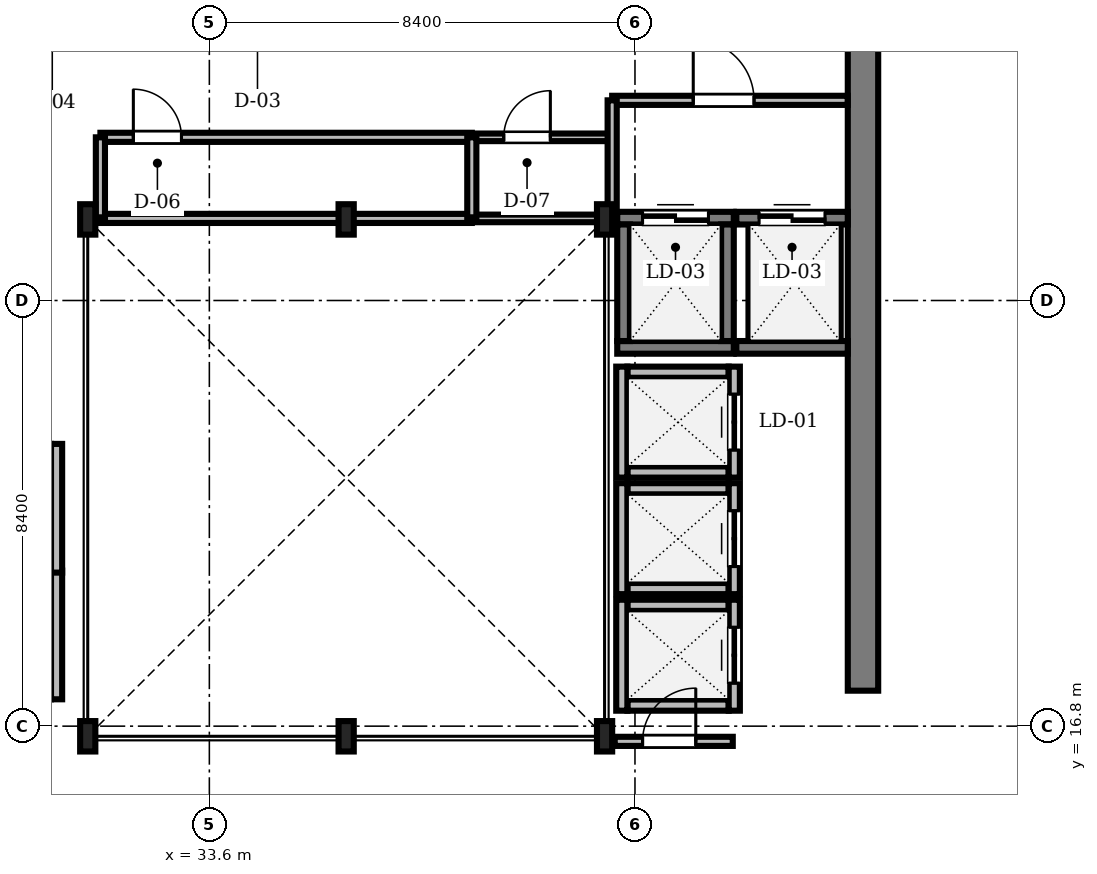
"""IFC4 building model, lengths in metres.
Left out: names, types, materials, properties, quantities, classifications, styles, units other than length and angle.
Written with IfcOpenShell. Run it as: python <this file> out.ifc"""

import sys

from ifc_helpers import new_model, si_unit, direction, frame, frame_2d, origin, origin_2d, place, context, subcontext, project, spatial, rectangle, i_section, extrude, source, transform, mapped, element, fill, save


model = new_model("IFC4")
c1 = context("Model", 3, precision=1e-05, world=origin(), true_north=direction((0.0, 1.0)))
c2 = subcontext(c1, "Body", "Model", "MODEL_VIEW")
j1 = project(units=[si_unit("LENGTHUNIT", "METRE"), si_unit("PLANEANGLEUNIT", "RADIAN")], contexts=[c1])
p1 = place(None, origin())
s1 = spatial("IfcSite", under=j1, at=p1, CompositionType="ELEMENT")
p2 = place(p1, origin())
s2 = spatial("IfcBuilding", under=s1, at=p2, CompositionType="ELEMENT")
p3 = place(p2, frame((0.0, 0.0, 246.65)))
s3 = spatial("IfcBuildingStorey", under=s2, at=p3, CompositionType="ELEMENT", Elevation=246.65)
m1 = source(origin(), c2, "Body", "SweptSolid", [
    extrude(rectangle(XDim=13.15, YDim=0.6, at=frame_2d((6.575, 0.0))), origin(), (0.0, 0.0, 1.0), 3.73),
])
p4 = place(p3, frame((46.5, 17.5, 0.0), z_axis=(0.0, 0.0, 1.0), x_axis=(0.0, 1.0, 0.0)))
e1 = element("IfcWall", 1, at=p4, inside=s3, PredefinedType="SHEAR", context=c2, shape_type="MappedRepresentation", body=[
    mapped(m1, transform((0.0, 0.0, 0.0), scale=1.0)),
])
m2 = source(origin(), c2, "Body", "SweptSolid", [
    extrude(i_section(OverallWidth=0.3, OverallDepth=0.6, WebThickness=0.015, FlangeThickness=0.03, FilletRadius=0.027, at=origin_2d()), origin(), (0.0, 0.0, 1.0), 3.73),
])
for number, where, z_axis, x_axis in (
    (2, (31.2, 16.6, 0.0), (0.0, 0.0, 1.0), (1.0, 0.0, 0.0)),
    (3, (36.3, 16.6, 0.0), (0.0, 0.0, 1.0), (1.0, 0.0, 0.0)),
    (4, (41.4, 16.6, 0.0), (0.0, 0.0, 1.0), (1.0, 0.0, 0.0)),
    (5, (41.4, 26.8, 0.0), (0.0, 0.0, 1.0), (1.0, 0.0, 0.0)),
    (6, (36.3, 26.8, 0.0), (0.0, 0.0, 1.0), (1.0, 0.0, 0.0)),
    (7, (31.2, 26.8, 0.0), (0.0, 0.0, 1.0), (1.0, 0.0, 0.0)),
):
    element("IfcColumn", number, at=place(p3, frame(where, z_axis=z_axis, x_axis=x_axis)), inside=s3, PredefinedType="COLUMN", context=c2, shape_type="MappedRepresentation", body=[
        mapped(m2, transform((0.0, 0.0, 0.0), scale=1.0)),
    ])
m3 = source(origin(), c2, "Body", "SweptSolid", [
    extrude(rectangle(XDim=2.0, YDim=0.22, at=frame_2d((1.0, 0.0))), origin(), (0.0, 0.0, 1.0), 3.73),
])
for number, where, z_axis, x_axis in (
    (8, (41.85, 21.815, 0.0), (0.0, 0.0, 1.0), (1.0, 0.0, 0.0)),
    (9, (41.85, 23.785, 0.0), (0.0, 0.0, 1.0), (1.0, 0.0, 0.0)),
):
    element("IfcWall", number, at=place(p3, frame(where, z_axis=z_axis, x_axis=x_axis)), inside=s3, PredefinedType="SOLIDWALL", context=c2, shape_type="MappedRepresentation", body=[
        mapped(m3, transform((0.0, 0.0, 0.0), scale=1.0)),
    ])
m4 = source(origin(), c2, "Body", "SweptSolid", [
    extrude(rectangle(XDim=2.19, YDim=0.22, at=frame_2d((1.095, 0.0))), origin(), (0.0, 0.0, 1.0), 3.73),
])
p5 = place(p3, frame((41.74, 21.705, 0.0), z_axis=(0.0, 0.0, 1.0), x_axis=(0.0, 1.0, 0.0)))
e10 = element("IfcWall", 10, at=p5, inside=s3, PredefinedType="SOLIDWALL", context=c2, shape_type="MappedRepresentation", body=[
    mapped(m4, transform((0.0, 0.0, 0.0), scale=1.0)),
])
p6 = place(p3, frame((43.96, 21.705, 0.0), z_axis=(0.0, 0.0, 1.0), x_axis=(0.0, 1.0, 0.0)))
e11 = element("IfcWall", 11, at=p6, inside=s3, PredefinedType="SOLIDWALL", context=c2, shape_type="MappedRepresentation", body=[
    mapped(m4, transform((0.0, 0.0, 0.0), scale=1.0)),
])
m5 = source(origin(), c2, "Body", "SweptSolid", [
    extrude(rectangle(XDim=1.1, YDim=2.2, at=frame_2d((0.55, 1.1))), frame((0.0, 0.12, 0.0), z_axis=(0.0, -1.0, 0.0), x_axis=(1.0, 0.0, 0.0)), (0.0, 0.0, 1.0), 0.24),
])
p7 = place(p6, frame((0.545, 0.0, 0.0)))
e12 = element("IfcOpeningElement", 12, at=p7, cuts=e11, PredefinedType="OPENING", context=c2, shape_type="MappedRepresentation", body=[
    mapped(m5, transform((0.0, 0.0, 0.0), scale=1.0)),
])
for number, where, z_axis, x_axis in (
    (13, (41.85, 19.515, 0.0), (0.0, 0.0, 1.0), (1.0, 0.0, 0.0)),
    (14, (41.85, 21.485, 0.0), (0.0, 0.0, 1.0), (1.0, 0.0, 0.0)),
):
    element("IfcWall", number, at=place(p3, frame(where, z_axis=z_axis, x_axis=x_axis)), inside=s3, PredefinedType="SOLIDWALL", context=c2, shape_type="MappedRepresentation", body=[
        mapped(m3, transform((0.0, 0.0, 0.0), scale=1.0)),
    ])
p8 = place(p3, frame((41.74, 19.405, 0.0), z_axis=(0.0, 0.0, 1.0), x_axis=(0.0, 1.0, 0.0)))
e15 = element("IfcWall", 15, at=p8, inside=s3, PredefinedType="SOLIDWALL", context=c2, shape_type="MappedRepresentation", body=[
    mapped(m4, transform((0.0, 0.0, 0.0), scale=1.0)),
])
p9 = place(p3, frame((43.96, 19.405, 0.0), z_axis=(0.0, 0.0, 1.0), x_axis=(0.0, 1.0, 0.0)))
e16 = element("IfcWall", 16, at=p9, inside=s3, PredefinedType="SOLIDWALL", context=c2, shape_type="MappedRepresentation", body=[
    mapped(m4, transform((0.0, 0.0, 0.0), scale=1.0)),
])
p10 = place(p9, frame((0.545, 0.0, 0.0)))
e17 = element("IfcOpeningElement", 17, at=p10, cuts=e16, PredefinedType="OPENING", context=c2, shape_type="MappedRepresentation", body=[
    mapped(m5, transform((0.0, 0.0, 0.0), scale=1.0)),
])
for number, where, z_axis, x_axis in (
    (18, (41.85, 17.215, 0.0), (0.0, 0.0, 1.0), (1.0, 0.0, 0.0)),
    (19, (41.85, 19.185, 0.0), (0.0, 0.0, 1.0), (1.0, 0.0, 0.0)),
):
    element("IfcWall", number, at=place(p3, frame(where, z_axis=z_axis, x_axis=x_axis)), inside=s3, PredefinedType="SOLIDWALL", context=c2, shape_type="MappedRepresentation", body=[
        mapped(m3, transform((0.0, 0.0, 0.0), scale=1.0)),
    ])
p11 = place(p3, frame((41.74, 17.105, 0.0), z_axis=(0.0, 0.0, 1.0), x_axis=(0.0, 1.0, 0.0)))
e20 = element("IfcWall", 20, at=p11, inside=s3, PredefinedType="SOLIDWALL", context=c2, shape_type="MappedRepresentation", body=[
    mapped(m4, transform((0.0, 0.0, 0.0), scale=1.0)),
])
p12 = place(p3, frame((43.96, 17.105, 0.0), z_axis=(0.0, 0.0, 1.0), x_axis=(0.0, 1.0, 0.0)))
e21 = element("IfcWall", 21, at=p12, inside=s3, PredefinedType="SOLIDWALL", context=c2, shape_type="MappedRepresentation", body=[
    mapped(m4, transform((0.0, 0.0, 0.0), scale=1.0)),
])
p13 = place(p12, frame((0.545, 0.0, 0.0)))
e22 = element("IfcOpeningElement", 22, at=p13, cuts=e21, PredefinedType="OPENING", context=c2, shape_type="MappedRepresentation", body=[
    mapped(m5, transform((0.0, 0.0, 0.0), scale=1.0)),
])
m6 = source(origin(), c2, "Body", "SweptSolid", [
    extrude(rectangle(XDim=2.54, YDim=0.22, at=frame_2d((1.27, 0.0))), origin(), (0.0, 0.0, 1.0), 3.73),
])
for number, where, z_axis, x_axis in (
    (23, (30.585, 17.33, 0.0), (0.0, 0.0, 1.0), (0.0, 1.0, 0.0)),
    (24, (30.585, 19.83, 0.0), (0.0, 0.0, 1.0), (0.0, 1.0, 0.0)),
):
    element("IfcWall", number, at=place(p3, frame(where, z_axis=z_axis, x_axis=x_axis)), inside=s3, PredefinedType="SOLIDWALL", context=c2, shape_type="MappedRepresentation", body=[
        mapped(m6, transform((0.0, 0.0, 0.0), scale=1.0)),
    ])
m7 = source(origin(), c2, "Body", "SweptSolid", [
    extrude(rectangle(XDim=2.3, YDim=0.25, at=frame_2d((1.15, 0.0))), origin(), (0.0, 0.0, 1.0), 3.73),
])
p14 = place(p3, frame((41.65, 24.275, 0.0), z_axis=(0.0, 0.0, 1.0), x_axis=(1.0, 0.0, 0.0)))
e25 = element("IfcWall", 25, at=p14, inside=s3, PredefinedType="SOLIDWALL", context=c2, shape_type="MappedRepresentation", body=[
    mapped(m7, transform((0.0, 0.0, 0.0), scale=1.0)),
])
p15 = place(p3, frame((41.65, 26.825, 0.0), z_axis=(0.0, 0.0, 1.0), x_axis=(1.0, 0.0, 0.0)))
e26 = element("IfcWall", 26, at=p15, inside=s3, PredefinedType="SOLIDWALL", context=c2, shape_type="MappedRepresentation", body=[
    mapped(m7, transform((0.0, 0.0, 0.0), scale=1.0)),
])
m8 = source(origin(), c2, "Body", "SweptSolid", [
    extrude(rectangle(XDim=1.3, YDim=2.3, at=frame_2d((0.65, 1.15))), frame((0.0, 0.135, 0.0), z_axis=(0.0, -1.0, 0.0), x_axis=(1.0, 0.0, 0.0)), (0.0, 0.0, 1.0), 0.27),
])
p16 = place(p15, frame((0.5, 0.0, 0.0)))
e27 = element("IfcOpeningElement", 27, at=p16, cuts=e26, PredefinedType="OPENING", context=c2, shape_type="MappedRepresentation", body=[
    mapped(m8, transform((0.0, 0.0, 0.0), scale=1.0)),
])
for number, where, z_axis, x_axis in (
    (28, (41.775, 24.4, 0.0), (0.0, 0.0, 1.0), (0.0, 1.0, 0.0)),
    (29, (43.825, 24.4, 0.0), (0.0, 0.0, 1.0), (0.0, 1.0, 0.0)),
):
    element("IfcWall", number, at=place(p3, frame(where, z_axis=z_axis, x_axis=x_axis)), inside=s3, PredefinedType="SOLIDWALL", context=c2, shape_type="MappedRepresentation", body=[
        mapped(m7, transform((0.0, 0.0, 0.0), scale=1.0)),
    ])
m9 = source(origin(), c2, "Body", "SweptSolid", [
    extrude(rectangle(XDim=2.2, YDim=0.25, at=frame_2d((1.1, 0.0))), origin(), (0.0, 0.0, 1.0), 3.73),
])
p17 = place(p3, frame((44.0, 24.275, 0.0), z_axis=(0.0, 0.0, 1.0), x_axis=(1.0, 0.0, 0.0)))
e30 = element("IfcWall", 30, at=p17, inside=s3, PredefinedType="SOLIDWALL", context=c2, shape_type="MappedRepresentation", body=[
    mapped(m9, transform((0.0, 0.0, 0.0), scale=1.0)),
])
p18 = place(p3, frame((44.0, 26.825, 0.0), z_axis=(0.0, 0.0, 1.0), x_axis=(1.0, 0.0, 0.0)))
e31 = element("IfcWall", 31, at=p18, inside=s3, PredefinedType="SOLIDWALL", context=c2, shape_type="MappedRepresentation", body=[
    mapped(m9, transform((0.0, 0.0, 0.0), scale=1.0)),
])
p19 = place(p18, frame((0.45, 0.0, 0.0)))
e32 = element("IfcOpeningElement", 32, at=p19, cuts=e31, PredefinedType="OPENING", context=c2, shape_type="MappedRepresentation", body=[
    mapped(m8, transform((0.0, 0.0, 0.0), scale=1.0)),
])
m10 = source(origin(), c2, "Body", "SweptSolid", [
    extrude(rectangle(XDim=7.33, YDim=0.18, at=frame_2d((3.665, 0.0))), origin(), (0.0, 0.0, 1.0), 3.362),
])
p20 = place(p3, frame((31.45, 28.42, 0.0), z_axis=(0.0, 0.0, 1.0), x_axis=(1.0, 0.0, 0.0)))
e33 = element("IfcWall", 33, at=p20, inside=s3, PredefinedType="PARTITIONING", context=c2, shape_type="MappedRepresentation", body=[
    mapped(m10, transform((0.0, 0.0, 0.0), scale=1.0)),
])
m11 = source(origin(), c2, "Body", "SweptSolid", [
    extrude(rectangle(XDim=0.95, YDim=2.15, at=frame_2d((0.475, 1.075))), frame((0.0, 0.1, 0.0), z_axis=(0.0, -1.0, 0.0), x_axis=(1.0, 0.0, 0.0)), (0.0, 0.0, 1.0), 0.2),
])
p21 = place(p20, frame((0.65, 0.0, 0.0)))
e34 = element("IfcOpeningElement", 34, at=p21, cuts=e33, PredefinedType="OPENING", context=c2, shape_type="MappedRepresentation", body=[
    mapped(m11, transform((0.0, 0.0, 0.0), scale=1.0)),
])
m12 = source(origin(), c2, "Body", "SweptSolid", [
    extrude(rectangle(XDim=4.648, YDim=0.18, at=frame_2d((2.324, 0.0))), origin(), (0.0, 0.0, 1.0), 3.362),
])
p22 = place(p3, frame((41.55, 29.15, 0.0), z_axis=(0.0, 0.0, 1.0), x_axis=(1.0, 0.0, 0.0)))
e35 = element("IfcWall", 35, at=p22, inside=s3, PredefinedType="PARTITIONING", context=c2, shape_type="MappedRepresentation", body=[
    mapped(m12, transform((0.0, 0.0, 0.0), scale=1.0)),
])
m13 = source(origin(), c2, "Body", "SweptSolid", [
    extrude(rectangle(XDim=1.2, YDim=2.2, at=frame_2d((0.6, 1.1))), frame((0.0, 0.1, 0.0), z_axis=(0.0, -1.0, 0.0), x_axis=(1.0, 0.0, 0.0)), (0.0, 0.0, 1.0), 0.2),
])
p23 = place(p22, frame((1.6, 0.0, 0.0)))
e36 = element("IfcOpeningElement", 36, at=p23, cuts=e35, PredefinedType="OPENING", context=c2, shape_type="MappedRepresentation", body=[
    mapped(m13, transform((0.0, 0.0, 0.0), scale=1.0)),
])
m14 = source(origin(), c2, "Body", "SweptSolid", [
    extrude(rectangle(XDim=2.74, YDim=0.15, at=frame_2d((1.37, 0.0))), origin(), (0.0, 0.0, 1.0), 3.73),
])
p24 = place(p3, frame((38.78, 28.42, 0.0), z_axis=(0.0, 0.0, 1.0), x_axis=(1.0, 0.0, 0.0)))
e37 = element("IfcWall", 37, at=p24, inside=s3, PredefinedType="PARTITIONING", context=c2, shape_type="MappedRepresentation", body=[
    mapped(m14, transform((0.0, 0.0, 0.0), scale=1.0)),
])
m15 = source(origin(), c2, "Body", "SweptSolid", [
    extrude(rectangle(XDim=0.92, YDim=2.1, at=frame_2d((0.46, 1.05))), frame((0.0, 0.085, 0.0), z_axis=(0.0, -1.0, 0.0), x_axis=(1.0, 0.0, 0.0)), (0.0, 0.0, 1.0), 0.17),
])
p25 = place(p24, frame((0.63, 0.0, 0.0)))
e38 = element("IfcOpeningElement", 38, at=p25, cuts=e37, PredefinedType="OPENING", context=c2, shape_type="MappedRepresentation", body=[
    mapped(m15, transform((0.0, 0.0, 0.0), scale=1.0)),
])
m16 = source(origin(), c2, "Body", "SweptSolid", [
    extrude(rectangle(XDim=2.33, YDim=0.18, at=frame_2d((1.165, 0.0))), origin(), (0.0, 0.0, 1.0), 3.172),
])
p26 = place(p3, frame((41.6, 16.5, 0.0), z_axis=(0.0, 0.0, 1.0), x_axis=(1.0, 0.0, 0.0)))
e39 = element("IfcWall", 39, at=p26, inside=s3, PredefinedType="PARTITIONING", context=c2, shape_type="MappedRepresentation", body=[
    mapped(m16, transform((0.0, 0.0, 0.0), scale=1.0)),
])
m17 = source(origin(), c2, "Body", "SweptSolid", [
    extrude(rectangle(XDim=1.05, YDim=2.2, at=frame_2d((0.525, 1.1))), frame((0.0, 0.1, 0.0), z_axis=(0.0, -1.0, 0.0), x_axis=(1.0, 0.0, 0.0)), (0.0, 0.0, 1.0), 0.2),
])
p27 = place(p26, frame((0.55, 0.0, 0.0)))
e40 = element("IfcOpeningElement", 40, at=p27, cuts=e39, PredefinedType="OPENING", context=c2, shape_type="MappedRepresentation", body=[
    mapped(m17, transform((0.0, 0.0, 0.0), scale=1.0)),
])
m18 = source(origin(), c2, "Body", "SweptSolid", [
    extrude(rectangle(XDim=7.33, YDim=0.18, at=frame_2d((3.665, 0.0))), origin(), (0.0, 0.0, 1.0), 3.272),
])
p28 = place(p3, frame((31.45, 26.82, 0.0), z_axis=(0.0, 0.0, 1.0), x_axis=(1.0, 0.0, 0.0)))
e41 = element("IfcWall", 41, at=p28, inside=s3, PredefinedType="PARTITIONING", context=c2, shape_type="MappedRepresentation", body=[
    mapped(m18, transform((0.0, 0.0, 0.0), scale=1.0)),
])
m19 = source(origin(), c2, "Body", "SweptSolid", [
    extrude(rectangle(XDim=2.74, YDim=0.15, at=frame_2d((1.37, 0.0))), origin(), (0.0, 0.0, 1.0), 3.272),
])
p29 = place(p3, frame((38.78, 26.82, 0.0), z_axis=(0.0, 0.0, 1.0), x_axis=(1.0, 0.0, 0.0)))
e42 = element("IfcWall", 42, at=p29, inside=s3, PredefinedType="PARTITIONING", context=c2, shape_type="MappedRepresentation", body=[
    mapped(m19, transform((0.0, 0.0, 0.0), scale=1.0)),
])
m20 = source(origin(), c2, "Body", "SweptSolid", [
    extrude(rectangle(XDim=2.35, YDim=0.18, at=frame_2d((1.175, 0.0))), origin(), (0.0, 0.0, 1.0), 3.362),
])
p30 = place(p3, frame((41.55, 26.8, 0.0), z_axis=(0.0, 0.0, 1.0), x_axis=(0.0, 1.0, 0.0)))
e43 = element("IfcWall", 43, at=p30, inside=s3, PredefinedType="PARTITIONING", context=c2, shape_type="MappedRepresentation", body=[
    mapped(m20, transform((0.0, 0.0, 0.0), scale=1.0)),
])
m21 = source(origin(), c2, "Body", "SweptSolid", [
    extrude(rectangle(XDim=1.6, YDim=0.18, at=frame_2d((0.8, 0.0))), origin(), (0.0, 0.0, 1.0), 3.272),
])
for number, where, z_axis, x_axis in (
    (44, (31.45, 26.82, 0.0), (0.0, 0.0, 1.0), (0.0, 1.0, 0.0)),
    (45, (38.78, 26.82, 0.0), (0.0, 0.0, 1.0), (0.0, 1.0, 0.0)),
):
    element("IfcWall", number, at=place(p3, frame(where, z_axis=z_axis, x_axis=x_axis)), inside=s3, PredefinedType="PARTITIONING", context=c2, shape_type="MappedRepresentation", body=[
        mapped(m21, transform((0.0, 0.0, 0.0), scale=1.0)),
    ])
m22 = source(origin(), c2, "Body", "SweptSolid", [
    extrude(rectangle(XDim=1.1, YDim=2.2, at=frame_2d((0.55, 1.1))), frame((0.0, 0.025, 0.0), z_axis=(0.0, -1.0, 0.0), x_axis=(1.0, 0.0, 0.0)), (0.0, 0.0, 1.0), 0.05),
])
p31 = place(p7, origin())
e46 = element("IfcDoor", 46, at=p31, inside=s3, OperationType="DOUBLE_DOOR_SLIDING", PredefinedType="DOOR", context=c2, shape_type="MappedRepresentation", body=[
    mapped(m22, transform((0.0, 0.0, 0.0), scale=1.0)),
])
fill(e12, e46)
p32 = place(p10, origin())
e47 = element("IfcDoor", 47, at=p32, inside=s3, OperationType="DOUBLE_DOOR_SLIDING", PredefinedType="DOOR", context=c2, shape_type="MappedRepresentation", body=[
    mapped(m22, transform((0.0, 0.0, 0.0), scale=1.0)),
])
fill(e17, e47)
p33 = place(p13, origin())
e48 = element("IfcDoor", 48, at=p33, inside=s3, OperationType="DOUBLE_DOOR_SLIDING", PredefinedType="DOOR", context=c2, shape_type="MappedRepresentation", body=[
    mapped(m22, transform((0.0, 0.0, 0.0), scale=1.0)),
])
fill(e22, e48)
m23 = source(origin(), c2, "Body", "SweptSolid", [
    extrude(rectangle(XDim=1.3, YDim=2.3, at=frame_2d((0.65, 1.15))), frame((0.0, 0.025, 0.0), z_axis=(0.0, -1.0, 0.0), x_axis=(1.0, 0.0, 0.0)), (0.0, 0.0, 1.0), 0.05),
])
p34 = place(p16, origin())
e49 = element("IfcDoor", 49, at=p34, inside=s3, OperationType="DOUBLE_DOOR_SLIDING", PredefinedType="DOOR", context=c2, shape_type="MappedRepresentation", body=[
    mapped(m23, transform((0.0, 0.0, 0.0), scale=1.0)),
])
fill(e27, e49)
p35 = place(p19, origin())
e50 = element("IfcDoor", 50, at=p35, inside=s3, OperationType="DOUBLE_DOOR_SLIDING", PredefinedType="DOOR", context=c2, shape_type="MappedRepresentation", body=[
    mapped(m23, transform((0.0, 0.0, 0.0), scale=1.0)),
])
fill(e32, e50)
m24 = source(origin(), c2, "Body", "SweptSolid", [
    extrude(rectangle(XDim=0.95, YDim=2.15, at=frame_2d((0.475, 1.075))), frame((0.0, 0.025, 0.0), z_axis=(0.0, -1.0, 0.0), x_axis=(1.0, 0.0, 0.0)), (0.0, 0.0, 1.0), 0.05),
])
p36 = place(p21, origin())
e51 = element("IfcDoor", 51, at=p36, inside=s3, OperationType="SINGLE_SWING_LEFT", PredefinedType="DOOR", context=c2, shape_type="MappedRepresentation", body=[
    mapped(m24, transform((0.0, 0.0, 0.0), scale=1.0)),
])
fill(e34, e51)
m25 = source(origin(), c2, "Body", "SweptSolid", [
    extrude(rectangle(XDim=1.2, YDim=2.2, at=frame_2d((0.6, 1.1))), frame((0.0, 0.025, 0.0), z_axis=(0.0, -1.0, 0.0), x_axis=(1.0, 0.0, 0.0)), (0.0, 0.0, 1.0), 0.05),
])
p37 = place(p23, origin())
e52 = element("IfcDoor", 52, at=p37, inside=s3, OperationType="SINGLE_SWING_LEFT", PredefinedType="DOOR", context=c2, shape_type="MappedRepresentation", body=[
    mapped(m25, transform((0.0, 0.0, 0.0), scale=1.0)),
])
fill(e36, e52)
m26 = source(origin(), c2, "Body", "SweptSolid", [
    extrude(rectangle(XDim=0.92, YDim=2.1, at=frame_2d((0.46, 1.05))), frame((0.0, 0.025, 0.0), z_axis=(0.0, -1.0, 0.0), x_axis=(1.0, 0.0, 0.0)), (0.0, 0.0, 1.0), 0.05),
])
p38 = place(p25, origin())
e53 = element("IfcDoor", 53, at=p38, inside=s3, OperationType="SINGLE_SWING_RIGHT", PredefinedType="DOOR", context=c2, shape_type="MappedRepresentation", body=[
    mapped(m26, transform((0.0, 0.0, 0.0), scale=1.0)),
])
fill(e38, e53)
m27 = source(origin(), c2, "Body", "SweptSolid", [
    extrude(rectangle(XDim=1.05, YDim=2.2, at=frame_2d((0.525, 1.1))), frame((0.0, 0.025, 0.0), z_axis=(0.0, -1.0, 0.0), x_axis=(1.0, 0.0, 0.0)), (0.0, 0.0, 1.0), 0.05),
])
p39 = place(p27, origin())
e54 = element("IfcDoor", 54, at=p39, inside=s3, OperationType="SINGLE_SWING_RIGHT", PredefinedType="DOOR", context=c2, shape_type="MappedRepresentation", body=[
    mapped(m27, transform((0.0, 0.0, 0.0), scale=1.0)),
])
fill(e40, e54)
save(model, sys.argv[1])
